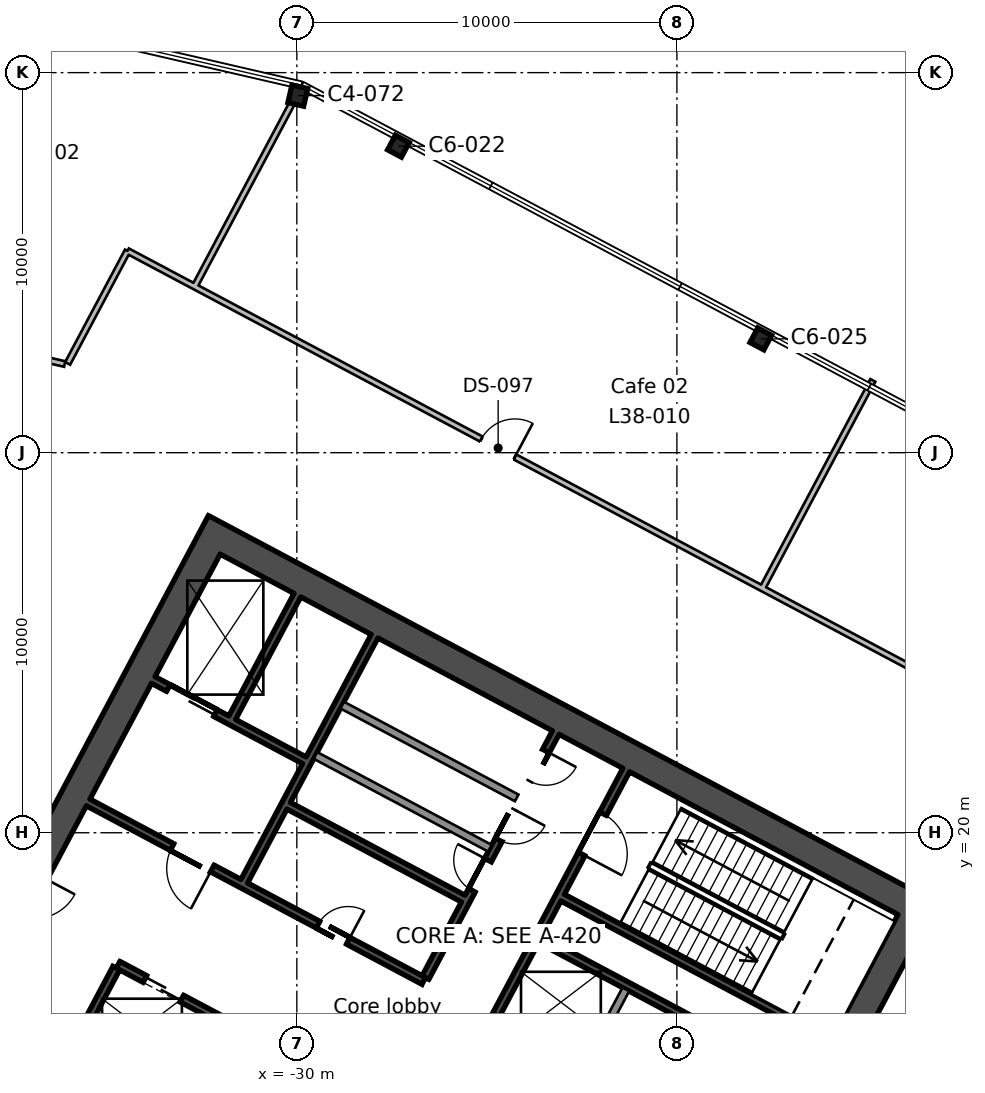
"""IFC4 building model, lengths in metres.
Left out: names, types, materials, properties, quantities, classifications, styles, units other than length and angle.
Written with IfcOpenShell. Run it as: python <this file> out.ifc"""

import sys

from ifc_helpers import new_model, si_unit, direction, frame, frame_2d, origin, origin_2d, place, context, subcontext, project, spatial, rectangle, i_section, extrude, element, fill, save


model = new_model("IFC4")
c1 = context("Model", 3, precision=1e-05, world=origin(), true_north=direction((0.0, 1.0)))
c2 = subcontext(c1, "Body", "Model", "MODEL_VIEW")
j1 = project(units=[si_unit("LENGTHUNIT", "METRE"), si_unit("PLANEANGLEUNIT", "RADIAN")], contexts=[c1])
p1 = place(None, origin())
s1 = spatial("IfcSite", under=j1, at=p1, CompositionType="ELEMENT")
p2 = place(p1, origin())
s2 = spatial("IfcBuilding", under=s1, at=p2, CompositionType="ELEMENT")
p3 = place(p2, frame((0.0, 0.0, 178.2)))
s3 = spatial("IfcBuildingStorey", under=s2, at=p3, CompositionType="ELEMENT", Elevation=178.2)
for number, where, z_axis, x_axis in (
    (1, (-17.792, 32.995, 0.0), (0.0, 0.0, 1.0), (-0.883, 0.469, 0.0)),
    (2, (-27.328, 38.065, 0.0), (0.0, 0.0, 1.0), (-0.883, 0.469, 0.0)),
):
    element("IfcColumn", number, at=place(p3, frame(where, z_axis=z_axis, x_axis=x_axis)), inside=s3, PredefinedType="COLUMN", context=c2, shape_type="SweptSolid", body=[
        extrude(i_section(OverallWidth=0.412, OverallDepth=0.434, WebThickness=0.036, FlangeThickness=0.057, FilletRadius=0.015, at=origin_2d()), origin(), (0.0, 0.0, 1.0), 5.4),
    ])
p4 = place(p3, frame((-29.975, 39.396, 0.0), z_axis=(0.0, 0.0, 1.0), x_axis=(-0.974370064785, 0.224951054344, 0.0)))
e3 = element("IfcColumn", 3, at=p4, inside=s3, PredefinedType="COLUMN", context=c2, shape_type="SweptSolid", body=[
    extrude(i_section(OverallWidth=0.424, OverallDepth=0.475, WebThickness=0.048, FlangeThickness=0.077, FilletRadius=0.015, at=origin_2d()), origin(), (0.0, 0.0, 1.0), 5.4),
])
p5 = place(p3, frame((-13.498, 18.333, 0.0), z_axis=(0.0, 0.0, 1.0), x_axis=(-0.469469918705, -0.88294846703, 0.0)))
e4 = element("IfcWall", 4, at=p5, inside=s3, PredefinedType="SHEAR", context=c2, shape_type="SweptSolid", body=[
    extrude(rectangle(XDim=19.7, YDim=0.75, at=frame_2d((9.85, 0.0))), origin(), (0.0, 0.0, 1.0), 5.4),
])
p6 = place(p5, frame((6.85, 0.0, 0.0)))
e5 = element("IfcOpeningElement", 5, at=p6, cuts=e4, PredefinedType="OPENING", context=c2, shape_type="SweptSolid", body=[
    extrude(rectangle(XDim=2.4, YDim=2.4, at=frame_2d((1.2, 1.2))), frame((0.0, 0.385, 0.0), z_axis=(0.0, -1.0, 0.0), x_axis=(1.0, 0.0, 0.0)), (0.0, 0.0, 1.0), 0.77),
])
p7 = place(p3, frame((-31.996, 28.168, 0.0), z_axis=(0.0, 0.0, 1.0), x_axis=(-0.469479580143, -0.882943329908, 0.0)))
e6 = element("IfcWall", 6, at=p7, inside=s3, PredefinedType="SHEAR", context=c2, shape_type="SweptSolid", body=[
    extrude(rectangle(XDim=19.7, YDim=0.75, at=frame_2d((9.85, 0.0))), origin(), (0.0, 0.0, 1.0), 5.4),
])
p8 = place(p7, frame((10.45, 0.0, 0.0)))
e7 = element("IfcOpeningElement", 7, at=p8, cuts=e6, PredefinedType="OPENING", context=c2, shape_type="SweptSolid", body=[
    extrude(rectangle(XDim=2.4, YDim=2.4, at=frame_2d((1.2, 1.2))), frame((0.0, 0.385, 0.0), z_axis=(0.0, -1.0, 0.0), x_axis=(1.0, 0.0, 0.0)), (0.0, 0.0, 1.0), 0.77),
])
p9 = place(p3, frame((-14.005, 18.178, 0.0), z_axis=(0.0, 0.0, 1.0), x_axis=(-0.88295010195, 0.469466843842, 0.0)))
e8 = element("IfcWall", 8, at=p9, inside=s3, PredefinedType="SHEAR", context=c2, shape_type="SweptSolid", body=[
    extrude(rectangle(XDim=20.2, YDim=0.75, at=frame_2d((10.1, 0.0))), origin(), (0.0, 0.0, 1.0), 5.4),
])
p10 = place(p3, frame((-21.344, 15.879, 0.0), z_axis=(0.0, 0.0, 1.0), x_axis=(-0.4694473164, -0.882960484464, 0.0)))
e9 = element("IfcWall", 9, at=p10, inside=s3, PredefinedType="SOLIDWALL", context=c2, shape_type="SweptSolid", body=[
    extrude(rectangle(XDim=2.2, YDim=0.2, at=frame_2d((1.1, 0.0))), origin(), (0.0, 0.0, 1.0), 5.4),
])
p11 = place(p3, frame((-21.333, 21.649, 0.0), z_axis=(0.0, 0.0, 1.0), x_axis=(-0.469494272526, -0.882935517501, 0.0)))
e10 = element("IfcWall", 10, at=p11, inside=s3, PredefinedType="SHEAR", context=c2, shape_type="SweptSolid", body=[
    extrude(rectangle(XDim=7.3, YDim=0.2, at=frame_2d((3.65, 0.0))), origin(), (0.0, 0.0, 1.0), 5.4),
])
p12 = place(p11, frame((1.3, 0.0, 0.0)))
e11 = element("IfcOpeningElement", 11, at=p12, cuts=e10, PredefinedType="OPENING", context=c2, shape_type="SweptSolid", body=[
    extrude(rectangle(XDim=1.2, YDim=2.1, at=frame_2d((0.6, 1.05))), frame((0.0, 0.11, 0.0), z_axis=(0.0, -1.0, 0.0), x_axis=(1.0, 0.0, 0.0)), (0.0, 0.0, 1.0), 0.22),
])
p13 = place(p3, frame((-23.188, 22.635, 0.0), z_axis=(0.0, 0.0, 1.0), x_axis=(-0.469454336211, -0.882956752176, 0.0)))
e12 = element("IfcWall", 12, at=p13, inside=s3, PredefinedType="SHEAR", context=c2, shape_type="SweptSolid", body=[
    extrude(rectangle(XDim=7.3, YDim=0.2, at=frame_2d((3.65, 0.0))), origin(), (0.0, 0.0, 1.0), 5.4),
])
p14 = place(p13, frame((0.55, 0.0, 0.0)))
e13 = element("IfcOpeningElement", 13, at=p14, cuts=e12, PredefinedType="OPENING", context=c2, shape_type="SweptSolid", body=[
    extrude(rectangle(XDim=0.9, YDim=2.1, at=frame_2d((0.45, 1.05))), frame((0.0, 0.11, 0.0), z_axis=(0.0, -1.0, 0.0), x_axis=(1.0, 0.0, 0.0)), (0.0, 0.0, 1.0), 0.22),
])
p15 = place(p13, frame((2.3, 0.0, 0.0)))
e14 = element("IfcOpeningElement", 14, at=p15, cuts=e12, PredefinedType="OPENING", context=c2, shape_type="SweptSolid", body=[
    extrude(rectangle(XDim=0.9, YDim=2.1, at=frame_2d((0.45, 1.05))), frame((0.0, 0.11, 0.0), z_axis=(0.0, -1.0, 0.0), x_axis=(1.0, 0.0, 0.0)), (0.0, 0.0, 1.0), 0.22),
])
p16 = place(p13, frame((3.8, 0.0, 0.0)))
e15 = element("IfcOpeningElement", 15, at=p16, cuts=e12, PredefinedType="OPENING", context=c2, shape_type="SweptSolid", body=[
    extrude(rectangle(XDim=0.9, YDim=2.1, at=frame_2d((0.45, 1.05))), frame((0.0, 0.11, 0.0), z_axis=(0.0, -1.0, 0.0), x_axis=(1.0, 0.0, 0.0)), (0.0, 0.0, 1.0), 0.22),
])
p17 = place(p3, frame((-27.955, 25.171, 0.0), z_axis=(0.0, 0.0, 1.0), x_axis=(-0.469480409012, -0.88294288918, 0.0)))
e16 = element("IfcWall", 16, at=p17, inside=s3, PredefinedType="SHEAR", context=c2, shape_type="SweptSolid", body=[
    extrude(rectangle(XDim=7.3, YDim=0.2, at=frame_2d((3.65, 0.0))), origin(), (0.0, 0.0, 1.0), 5.4),
])
p18 = place(p3, frame((-34.75, 16.438, 0.0), z_axis=(0.0, 0.0, 1.0), x_axis=(-0.469401318492, -0.882984938828, 0.0)))
e17 = element("IfcWall", 17, at=p18, inside=s3, PredefinedType="SHEAR", context=c2, shape_type="SweptSolid", body=[
    extrude(rectangle(XDim=2.2, YDim=0.2, at=frame_2d((1.1, 0.0))), origin(), (0.0, 0.0, 1.0), 5.4),
])
p19 = place(p3, frame((-29.986, 26.25, 0.0), z_axis=(0.0, 0.0, 1.0), x_axis=(-0.469494272526, -0.882935517501, 0.0)))
e18 = element("IfcWall", 18, at=p19, inside=s3, PredefinedType="SHEAR", context=c2, shape_type="SweptSolid", body=[
    extrude(rectangle(XDim=3.65, YDim=0.2, at=frame_2d((1.825, 0.0))), origin(), (0.0, 0.0, 1.0), 5.4),
])
p20 = place(p3, frame((-24.215, 20.917, 0.0), z_axis=(0.0, 0.0, 1.0), x_axis=(-0.882964314875, 0.469440111896, 0.0)))
e19 = element("IfcWall", 19, at=p20, inside=s3, PredefinedType="SOLIDWALL", context=c2, shape_type="SweptSolid", body=[
    extrude(rectangle(XDim=5.2, YDim=0.2, at=frame_2d((2.6, 0.0))), origin(), (0.0, 0.0, 1.0), 5.4),
])
p21 = place(p3, frame((-24.919, 19.592, 0.0), z_axis=(0.0, 0.0, 1.0), x_axis=(-0.882953967957, 0.469459572775, 0.0)))
e20 = element("IfcWall", 20, at=p21, inside=s3, PredefinedType="SOLIDWALL", context=c2, shape_type="SweptSolid", body=[
    extrude(rectangle(XDim=5.2, YDim=0.2, at=frame_2d((2.6, 0.0))), origin(), (0.0, 0.0, 1.0), 5.4),
])
p22 = place(p3, frame((-15.942, 14.536, 0.0), z_axis=(0.0, 0.0, 1.0), x_axis=(-0.882946947542, 0.469472776449, 0.0)))
e21 = element("IfcWall", 21, at=p22, inside=s3, PredefinedType="SHEAR", context=c2, shape_type="SweptSolid", body=[
    extrude(rectangle(XDim=8.0, YDim=0.2, at=frame_2d((4.0, 0.0))), origin(), (0.0, 0.0, 1.0), 5.4),
])
p23 = place(p3, frame((-29.804, 21.906, 0.0), z_axis=(0.0, 0.0, 1.0), x_axis=(-0.882960433586, 0.469447412093, 0.0)))
e22 = element("IfcWall", 22, at=p23, inside=s3, PredefinedType="SHEAR", context=c2, shape_type="SweptSolid", body=[
    extrude(rectangle(XDim=4.5, YDim=0.2, at=frame_2d((2.25, 0.0))), origin(), (0.0, 0.0, 1.0), 5.4),
])
p24 = place(p23, frame((2.65, 0.0, 0.0)))
e23 = element("IfcOpeningElement", 23, at=p24, cuts=e22, PredefinedType="OPENING", context=c2, shape_type="SweptSolid", body=[
    extrude(rectangle(XDim=1.4, YDim=2.4, at=frame_2d((0.7, 1.2))), frame((0.0, 0.11, 0.0), z_axis=(0.0, -1.0, 0.0), x_axis=(1.0, 0.0, 0.0)), (0.0, 0.0, 1.0), 0.22),
])
p25 = place(p3, frame((-16.529, 13.432, 0.0), z_axis=(0.0, 0.0, 1.0), x_axis=(-0.88295287151, 0.469461634952, 0.0)))
e24 = element("IfcWall", 24, at=p25, inside=s3, PredefinedType="SHEAR", context=c2, shape_type="SweptSolid", body=[
    extrude(rectangle(XDim=8.0, YDim=0.2, at=frame_2d((4.0, 0.0))), origin(), (0.0, 0.0, 1.0), 5.4),
])
p26 = place(p3, frame((-25.623, 18.268, 0.0), z_axis=(0.0, 0.0, 1.0), x_axis=(-0.882953967957, 0.469459572775, 0.0)))
e25 = element("IfcWall", 25, at=p26, inside=s3, PredefinedType="SHEAR", context=c2, shape_type="SweptSolid", body=[
    extrude(rectangle(XDim=5.2, YDim=0.2, at=frame_2d((2.6, 0.0))), origin(), (0.0, 0.0, 1.0), 5.4),
])
p27 = place(p3, frame((-26.662, 16.102, 0.0), z_axis=(0.0, 0.0, 1.0), x_axis=(-0.882940221191, 0.469485426614, 0.0)))
e26 = element("IfcWall", 26, at=p27, inside=s3, PredefinedType="SHEAR", context=c2, shape_type="SweptSolid", body=[
    extrude(rectangle(XDim=10.0, YDim=0.2, at=frame_2d((5.0, 0.0))), origin(), (0.0, 0.0, 1.0), 5.4),
])
p28 = place(p27, frame((6.3, 0.0, 0.0)))
e27 = element("IfcOpeningElement", 27, at=p28, cuts=e26, PredefinedType="OPENING", context=c2, shape_type="SweptSolid", body=[
    extrude(rectangle(XDim=1.2, YDim=2.1, at=frame_2d((0.6, 1.05))), frame((0.0, 0.11, 0.0), z_axis=(0.0, -1.0, 0.0), x_axis=(1.0, 0.0, 0.0)), (0.0, 0.0, 1.0), 0.22),
])
p29 = place(p27, frame((2.25, 0.0, 0.0)))
e28 = element("IfcOpeningElement", 28, at=p29, cuts=e26, PredefinedType="OPENING", context=c2, shape_type="SweptSolid", body=[
    extrude(rectangle(XDim=0.9, YDim=2.1, at=frame_2d((0.45, 1.05))), frame((0.0, 0.11, 0.0), z_axis=(0.0, -1.0, 0.0), x_axis=(1.0, 0.0, 0.0)), (0.0, 0.0, 1.0), 0.22),
])
p30 = place(p3, frame((-29.935, 13.991, 0.0), z_axis=(0.0, 0.0, 1.0), x_axis=(-0.882952937579, 0.469461510692, 0.0)))
e29 = element("IfcWall", 29, at=p30, inside=s3, PredefinedType="SHEAR", context=c2, shape_type="SweptSolid", body=[
    extrude(rectangle(XDim=5.4, YDim=0.2, at=frame_2d((2.7, 0.0))), origin(), (0.0, 0.0, 1.0), 5.4),
])
p31 = place(p30, frame((0.8, 0.0, 0.0)))
e30 = element("IfcOpeningElement", 30, at=p31, cuts=e29, PredefinedType="OPENING", context=c2, shape_type="SweptSolid", body=[
    extrude(rectangle(XDim=1.1, YDim=2.1, at=frame_2d((0.55, 1.05))), frame((0.0, 0.11, 0.0), z_axis=(0.0, -1.0, 0.0), x_axis=(1.0, 0.0, 0.0)), (0.0, 0.0, 1.0), 0.22),
])
p32 = place(p30, frame((3.5, 0.0, 0.0)))
e31 = element("IfcOpeningElement", 31, at=p32, cuts=e29, PredefinedType="OPENING", context=c2, shape_type="SweptSolid", body=[
    extrude(rectangle(XDim=1.1, YDim=2.1, at=frame_2d((0.55, 1.05))), frame((0.0, 0.11, 0.0), z_axis=(0.0, -1.0, 0.0), x_axis=(1.0, 0.0, 0.0)), (0.0, 0.0, 1.0), 0.22),
])
p33 = place(p3, frame((-31.15, 11.919, 0.0), z_axis=(0.0, 0.0, 1.0), x_axis=(-0.882940221191, 0.469485426614, 0.0)))
e32 = element("IfcWall", 32, at=p33, inside=s3, PredefinedType="SHEAR", context=c2, shape_type="SweptSolid", body=[
    extrude(rectangle(XDim=8.0, YDim=0.2, at=frame_2d((4.0, 0.0))), origin(), (0.0, 0.0, 1.0), 5.4),
])
p34 = place(p3, frame((-36.109, 32.333, 0.0), z_axis=(0.0, 0.0, 1.0), x_axis=(-0.974409020702, 0.224782251021, 0.0)))
e33 = element("IfcWall", 33, at=p34, inside=s3, PredefinedType="PARTITIONING", context=c2, shape_type="SweptSolid", body=[
    extrude(rectangle(XDim=4.154, YDim=0.15, at=frame_2d((2.077, 0.0))), origin(), (0.0, 0.0, 1.0), 4.95),
])
p35 = place(p34, frame((1.609, 0.0, 0.0)))
e34 = element("IfcOpeningElement", 34, at=p35, cuts=e33, PredefinedType="OPENING", context=c2, shape_type="SweptSolid", body=[
    extrude(rectangle(XDim=1.0, YDim=2.1, at=frame_2d((0.5, 1.05))), frame((0.0, 0.085, 0.0), z_axis=(0.0, -1.0, 0.0), x_axis=(1.0, 0.0, 0.0)), (0.0, 0.0, 1.0), 0.17),
])
p36 = place(p3, frame((-32.694, 34.372, 0.0), z_axis=(0.0, 0.0, 1.0), x_axis=(-0.883022288262, 0.469331054196, 0.0)))
e35 = element("IfcWall", 35, at=p36, inside=s3, PredefinedType="PARTITIONING", context=c2, shape_type="SweptSolid", body=[
    extrude(rectangle(XDim=1.997, YDim=0.15, at=frame_2d((0.998, 0.0))), origin(), (0.0, 0.0, 1.0), 4.95),
])
p37 = place(p3, frame((-36.031, 32.349, 0.0), z_axis=(0.0, 0.0, 1.0), x_axis=(0.469730105037, 0.882810074944, 0.0)))
e36 = element("IfcWall", 36, at=p37, inside=s3, PredefinedType="PARTITIONING", context=c2, shape_type="SweptSolid", body=[
    extrude(rectangle(XDim=3.353, YDim=0.15, at=frame_2d((1.676, 0.0))), origin(), (0.0, 0.0, 1.0), 4.95),
])
p38 = place(p3, frame((-32.694, 34.372, 0.0), z_axis=(0.0, 0.0, 1.0), x_axis=(0.882941399111, -0.469483211346, 0.0)))
e37 = element("IfcWall", 37, at=p38, inside=s3, PredefinedType="PARTITIONING", context=c2, shape_type="SweptSolid", body=[
    extrude(rectangle(XDim=18.067, YDim=0.15, at=frame_2d((9.034, 0.0))), origin(), (0.0, 0.0, 1.0), 4.95),
])
p39 = place(p38, frame((8.55, 0.0, 0.0)))
e38 = element("IfcOpeningElement", 38, at=p39, cuts=e37, PredefinedType="OPENING", context=c2, shape_type="SweptSolid", body=[
    extrude(rectangle(XDim=1.0, YDim=2.1, at=frame_2d((0.5, 1.05))), frame((0.0, 0.085, 0.0), z_axis=(0.0, -1.0, 0.0), x_axis=(1.0, 0.0, 0.0)), (0.0, 0.0, 1.0), 0.17),
])
p40 = place(p3, frame((-30.129, 39.188, 0.0), z_axis=(0.0, 0.0, 1.0), x_axis=(-0.469375494652, -0.882998666488, 0.0)))
e39 = element("IfcWall", 39, at=p40, inside=s3, PredefinedType="PARTITIONING", context=c2, shape_type="SweptSolid", body=[
    extrude(rectangle(XDim=5.456, YDim=0.15, at=frame_2d((2.728, 0.0))), origin(), (0.0, 0.0, 1.0), 4.95),
])
p41 = place(p3, frame((-14.844, 31.903, 0.0), z_axis=(0.0, 0.0, 1.0), x_axis=(-0.469314518965, -0.883031076627, 0.0)))
e40 = element("IfcWall", 40, at=p41, inside=s3, PredefinedType="PARTITIONING", context=c2, shape_type="SweptSolid", body=[
    extrude(rectangle(XDim=6.2, YDim=0.15, at=frame_2d((3.1, 0.0))), origin(), (0.0, 0.0, 1.0), 4.95),
])
p42 = place(p3, frame((-16.742, 25.89, 0.0), z_axis=(0.0, 0.0, 1.0), x_axis=(0.882955727844, -0.469456262784, 0.0)))
e41 = element("IfcWall", 41, at=p42, inside=s3, PredefinedType="PARTITIONING", context=c2, shape_type="SweptSolid", body=[
    extrude(rectangle(XDim=11.937, YDim=0.15, at=frame_2d((5.969, 0.0))), origin(), (0.0, 0.0, 1.0), 4.95),
])
p43 = place(p28, origin())
e42 = element("IfcDoor", 42, at=p43, inside=s3, OperationType="SINGLE_SWING_LEFT", PredefinedType="DOOR", context=c2, shape_type="SweptSolid", body=[
    extrude(rectangle(XDim=1.2, YDim=2.1, at=frame_2d((0.6, 1.05))), frame((0.0, 0.025, 0.0), z_axis=(0.0, -1.0, 0.0), x_axis=(1.0, 0.0, 0.0)), (0.0, 0.0, 1.0), 0.05),
])
fill(e27, e42)
p44 = place(p12, origin())
e43 = element("IfcDoor", 43, at=p44, inside=s3, OperationType="SINGLE_SWING_RIGHT", PredefinedType="DOOR", context=c2, shape_type="SweptSolid", body=[
    extrude(rectangle(XDim=1.2, YDim=2.1, at=frame_2d((0.6, 1.05))), frame((0.0, 0.025, 0.0), z_axis=(0.0, -1.0, 0.0), x_axis=(1.0, 0.0, 0.0)), (0.0, 0.0, 1.0), 0.05),
])
fill(e11, e43)
p45 = place(p29, frame((0.9, 0.0, 0.0), z_axis=(0.0, 0.0, 1.0), x_axis=(-1.0, 0.0, 0.0)))
e44 = element("IfcDoor", 44, at=p45, inside=s3, OperationType="SINGLE_SWING_RIGHT", PredefinedType="DOOR", context=c2, shape_type="SweptSolid", body=[
    extrude(rectangle(XDim=0.9, YDim=2.1, at=frame_2d((0.45, 1.05))), frame((0.0, 0.025, 0.0), z_axis=(0.0, -1.0, 0.0), x_axis=(1.0, 0.0, 0.0)), (0.0, 0.0, 1.0), 0.05),
])
fill(e28, e44)
p46 = place(p32, origin())
e45 = element("IfcDoor", 45, at=p46, inside=s3, OperationType="DOUBLE_DOOR_SLIDING", PredefinedType="DOOR", context=c2, shape_type="SweptSolid", body=[
    extrude(rectangle(XDim=1.1, YDim=2.1, at=frame_2d((0.55, 1.05))), frame((0.0, 0.025, 0.0), z_axis=(0.0, -1.0, 0.0), x_axis=(1.0, 0.0, 0.0)), (0.0, 0.0, 1.0), 0.05),
])
fill(e31, e45)
p47 = place(p24, origin())
e46 = element("IfcDoor", 46, at=p47, inside=s3, OperationType="DOUBLE_DOOR_SLIDING", PredefinedType="DOOR", context=c2, shape_type="SweptSolid", body=[
    extrude(rectangle(XDim=1.4, YDim=2.4, at=frame_2d((0.7, 1.2))), frame((0.0, 0.025, 0.0), z_axis=(0.0, -1.0, 0.0), x_axis=(1.0, 0.0, 0.0)), (0.0, 0.0, 1.0), 0.05),
])
fill(e23, e46)
p48 = place(p14, origin())
e47 = element("IfcDoor", 47, at=p48, inside=s3, OperationType="SINGLE_SWING_LEFT", PredefinedType="DOOR", context=c2, shape_type="SweptSolid", body=[
    extrude(rectangle(XDim=0.9, YDim=2.1, at=frame_2d((0.45, 1.05))), frame((0.0, 0.025, 0.0), z_axis=(0.0, -1.0, 0.0), x_axis=(1.0, 0.0, 0.0)), (0.0, 0.0, 1.0), 0.05),
])
fill(e13, e47)
p49 = place(p15, origin())
e48 = element("IfcDoor", 48, at=p49, inside=s3, OperationType="SINGLE_SWING_LEFT", PredefinedType="DOOR", context=c2, shape_type="SweptSolid", body=[
    extrude(rectangle(XDim=0.9, YDim=2.1, at=frame_2d((0.45, 1.05))), frame((0.0, 0.025, 0.0), z_axis=(0.0, -1.0, 0.0), x_axis=(1.0, 0.0, 0.0)), (0.0, 0.0, 1.0), 0.05),
])
fill(e14, e48)
p50 = place(p16, frame((0.9, 0.0, 0.0), z_axis=(0.0, 0.0, 1.0), x_axis=(-1.0, 0.0, 0.0)))
e49 = element("IfcDoor", 49, at=p50, inside=s3, OperationType="SINGLE_SWING_RIGHT", PredefinedType="DOOR", context=c2, shape_type="SweptSolid", body=[
    extrude(rectangle(XDim=0.9, YDim=2.1, at=frame_2d((0.45, 1.05))), frame((0.0, 0.025, 0.0), z_axis=(0.0, -1.0, 0.0), x_axis=(1.0, 0.0, 0.0)), (0.0, 0.0, 1.0), 0.05),
])
fill(e15, e49)
p51 = place(p39, origin())
e50 = element("IfcDoor", 50, at=p51, inside=s3, OperationType="SINGLE_SWING_RIGHT", PredefinedType="DOOR", context=c2, shape_type="SweptSolid", body=[
    extrude(rectangle(XDim=1.0, YDim=2.1, at=frame_2d((0.5, 1.05))), frame((0.0, 0.025, 0.0), z_axis=(0.0, -1.0, 0.0), x_axis=(1.0, 0.0, 0.0)), (0.0, 0.0, 1.0), 0.05),
])
fill(e38, e50)
save(model, sys.argv[1])
